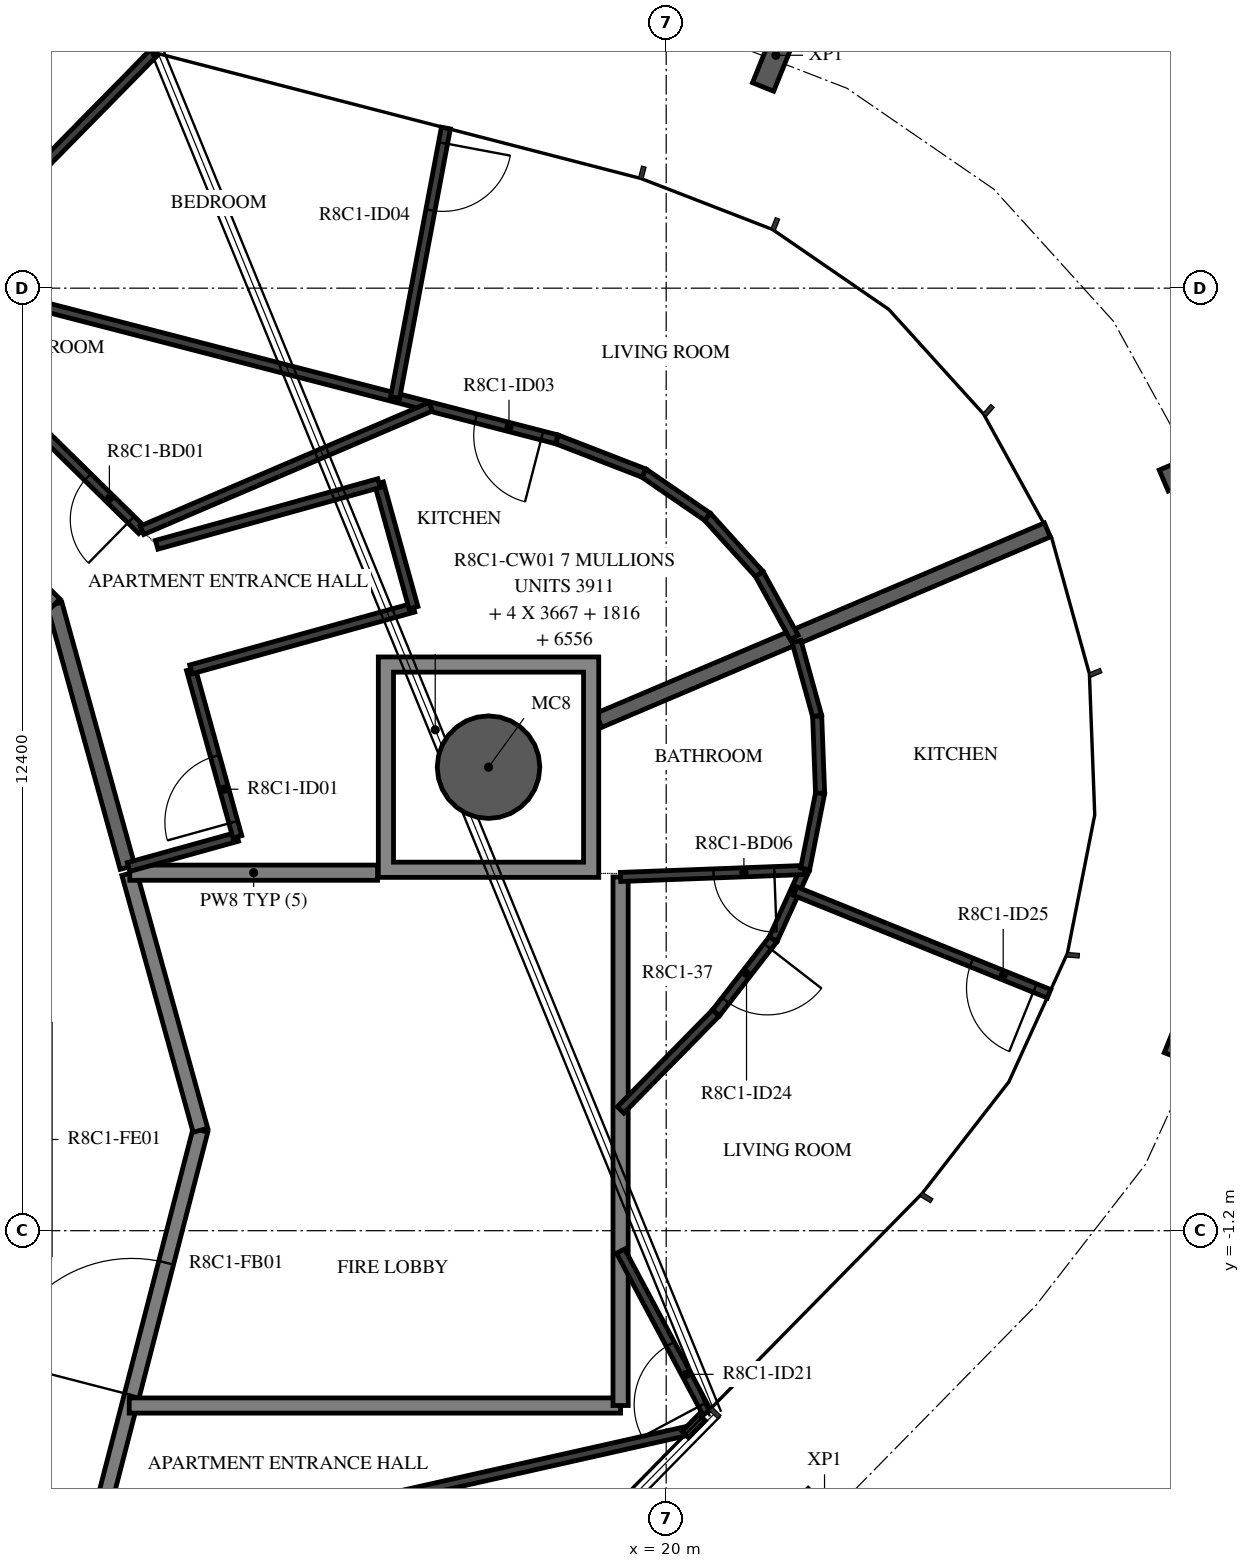
"""IFC4 building model, lengths in metres.
Left out: names, types, materials, properties, quantities, classifications, styles, units other than length and angle.
Written with IfcOpenShell. Run it as: python <this file> out.ifc"""

import sys

from ifc_helpers import new_model, si_unit, direction, frame, frame_2d, origin, origin_2d, place, context, subcontext, project, spatial, polyline, rectangle, hollow_circle, i_section, outline, extrude, element, fill, save


model = new_model("IFC4")
c1 = context("Model", 3, precision=1e-05, world=origin(), true_north=direction((0.0, 1.0)))
c2 = subcontext(c1, "Body", "Model", "MODEL_VIEW")
j1 = project(units=[si_unit("LENGTHUNIT", "METRE"), si_unit("PLANEANGLEUNIT", "RADIAN")], contexts=[c1])
p1 = place(None, origin())
s1 = spatial("IfcSite", under=j1, at=p1, CompositionType="ELEMENT")
p2 = place(p1, origin())
s2 = spatial("IfcBuilding", under=s1, at=p2, CompositionType="ELEMENT")
p3 = place(p2, frame((0.0, 0.0, 322.7)))
s3 = spatial("IfcBuildingStorey", under=s2, at=p3, CompositionType="ELEMENT", Elevation=322.7)
p4 = place(p3, frame((17.663, 4.898, -0.38), z_axis=(0.0, 0.0, 1.0), x_axis=(1.0, 0.0, 0.0)))
e1 = element("IfcColumn", 1, at=p4, inside=s3, PredefinedType="COLUMN", context=c2, shape_type="SweptSolid", body=[
    extrude(hollow_circle(Radius=0.675, WallThickness=0.03, at=origin_2d()), origin(), (0.0, 0.0, 1.0), 2.616),
])
for number, where, z_axis, x_axis in (
    (2, (22.083, -5.013, -0.38), (0.0, 0.0, 1.0), (-0.701, -0.713, 0.0)),
    (3, (27.026, 1.113, -0.38), (0.0, 0.0, 1.0), (-0.375, -0.927, 0.0)),
    (4, (26.96, 8.845, -0.38), (0.0, 0.0, 1.0), (0.391, -0.92, 0.0)),
    (5, (21.443, 14.264, -0.38), (0.0, 0.0, 1.0), (0.927, -0.374, 0.0)),
):
    element("IfcColumn", number, at=place(p3, frame(where, z_axis=z_axis, x_axis=x_axis)), inside=s3, PredefinedType="COLUMN", context=c2, shape_type="SweptSolid", body=[
        extrude(i_section(OverallWidth=0.3, OverallDepth=0.9, WebThickness=0.019, FlangeThickness=0.035, FilletRadius=0.03, at=origin_2d()), origin(), (0.0, 0.0, 1.0), 2.616),
    ])
p5 = place(p3, frame((12.074, -6.831, 0.0), z_axis=(0.0, 0.0, 1.0), x_axis=(0.250391063186, 0.968144780225, 0.0)))
e6 = element("IfcWall", 6, at=p5, inside=s3, PredefinedType="STANDARD", context=c2, shape_type="SweptSolid", body=[
    extrude(rectangle(XDim=7.181, YDim=0.2, at=frame_2d((3.591, 0.0))), origin(), (0.0, 0.0, 1.0), 3.05),
])
p6 = place(p5, frame((3.581, 0.0, 0.0)))
e7 = element("IfcOpeningElement", 7, at=p6, cuts=e6, PredefinedType="OPENING", context=c2, shape_type="SweptSolid", body=[
    extrude(rectangle(XDim=1.8, YDim=2.1, at=frame_2d((0.9, 1.05))), frame((0.0, 0.11, 0.0), z_axis=(0.0, -1.0, 0.0), x_axis=(1.0, 0.0, 0.0)), (0.0, 0.0, 1.0), 0.22),
])
p7 = place(p3, frame((13.872, 0.121, 0.0), z_axis=(0.0, 0.0, 1.0), x_axis=(-0.267291928416, 0.963615600228, 0.0)))
e8 = element("IfcWall", 8, at=p7, inside=s3, PredefinedType="STANDARD", context=c2, shape_type="SweptSolid", body=[
    extrude(rectangle(XDim=3.507, YDim=0.2, at=frame_2d((1.753, 0.0))), origin(), (0.0, 0.0, 1.0), 3.05),
])
p8 = place(p3, frame((12.913, 3.581, 0.0), z_axis=(0.0, 0.0, 1.0), x_axis=(-0.267223005422, 0.963634715737, 0.0)))
e9 = element("IfcWall", 9, at=p8, inside=s3, PredefinedType="STANDARD", context=c2, shape_type="SweptSolid", body=[
    extrude(rectangle(XDim=3.591, YDim=0.2, at=frame_2d((1.795, 0.0))), origin(), (0.0, 0.0, 1.0), 3.05),
])
p9 = place(p3, frame((11.953, 7.041, 0.0), z_axis=(0.0, 0.0, 1.0), x_axis=(-0.713250549143, 0.70090916255, 0.0)))
e10 = element("IfcWall", 10, at=p9, inside=s3, PredefinedType="STANDARD", context=c2, shape_type="SweptSolid", body=[
    extrude(rectangle(XDim=7.181, YDim=0.2, at=frame_2d((3.59, 0.0))), origin(), (0.0, 0.0, 1.0), 3.05),
])
p10 = place(p9, frame((2.6, 0.0, 0.0)))
e11 = element("IfcOpeningElement", 11, at=p10, cuts=e10, PredefinedType="OPENING", context=c2, shape_type="SweptSolid", body=[
    extrude(rectangle(XDim=1.0, YDim=2.1, at=frame_2d((0.5, 1.05))), frame((0.0, 0.11, 0.0), z_axis=(0.0, -1.0, 0.0), x_axis=(1.0, 0.0, 0.0)), (0.0, 0.0, 1.0), 0.22),
])
p11 = place(p3, frame((16.203, 3.51, 0.0), z_axis=(0.0, 0.0, 1.0), x_axis=(-1.0, 0.0, 0.0)))
e12 = element("IfcWall", 12, at=p11, inside=s3, PredefinedType="STANDARD", context=c2, shape_type="SweptSolid", body=[
    extrude(rectangle(XDim=3.26, YDim=0.2, at=frame_2d((1.63, 0.0))), origin(), (0.0, 0.0, 1.0), 3.05),
])
p12 = place(p3, frame((12.936, -3.5, 0.0), z_axis=(0.0, 0.0, 1.0), x_axis=(1.0, 0.0, 0.0)))
e13 = element("IfcWall", 13, at=p12, inside=s3, PredefinedType="STANDARD", context=c2, shape_type="SweptSolid", body=[
    extrude(rectangle(XDim=6.464, YDim=0.2, at=frame_2d((3.232, 0.0))), origin(), (0.0, 0.0, 1.0), 3.05),
])
p13 = place(p3, frame((19.4, -3.5, 0.0), z_axis=(0.0, 0.0, 1.0), x_axis=(0.0, 1.0, 0.0)))
e14 = element("IfcWall", 14, at=p13, inside=s3, PredefinedType="STANDARD", context=c2, shape_type="SweptSolid", body=[
    extrude(rectangle(XDim=6.954, YDim=0.2, at=frame_2d((3.477, 0.0))), origin(), (0.0, 0.0, 1.0), 3.05),
])
p14 = place(p3, frame((19.113, 5.514, 0.0), z_axis=(0.0, 0.0, 1.0), x_axis=(0.920500452946, 0.390741495269, 0.0)))
e15 = element("IfcWall", 15, at=p14, inside=s3, PredefinedType="STANDARD", context=c2, shape_type="SweptSolid", body=[
    extrude(rectangle(XDim=6.412, YDim=0.2, at=frame_2d((3.206, 0.0))), origin(), (0.0, 0.0, 1.0), 3.05),
])
p15 = place(p3, frame((12.927, 3.585, 0.0), z_axis=(0.0, 0.0, 1.0), x_axis=(0.963616756608, 0.26728775951, 0.0)))
e16 = element("IfcWall", 16, at=p15, inside=s3, PredefinedType="PARTITIONING", context=c2, shape_type="SweptSolid", body=[
    extrude(rectangle(XDim=1.485, YDim=0.12, at=frame_2d((0.743, 0.0))), origin(), (0.0, 0.0, 1.0), 3.05),
])
p16 = place(p3, frame((14.358, 3.982, 0.0), z_axis=(0.0, 0.0, 1.0), x_axis=(-0.267263698345, 0.963623430364, 0.0)))
e17 = element("IfcWall", 17, at=p16, inside=s3, PredefinedType="PARTITIONING", context=c2, shape_type="SweptSolid", body=[
    extrude(rectangle(XDim=2.286, YDim=0.12, at=frame_2d((1.143, 0.0))), origin(), (0.0, 0.0, 1.0), 3.05),
])
p17 = place(p16, frame((0.2, 0.0, 0.0)))
e18 = element("IfcOpeningElement", 18, at=p17, cuts=e17, PredefinedType="OPENING", context=c2, shape_type="SweptSolid", body=[
    extrude(rectangle(XDim=0.9, YDim=2.1, at=frame_2d((0.45, 1.05))), frame((0.0, 0.07, 0.0), z_axis=(0.0, -1.0, 0.0), x_axis=(1.0, 0.0, 0.0)), (0.0, 0.0, 1.0), 0.14),
])
p18 = place(p3, frame((13.747, 6.184, 0.0), z_axis=(0.0, 0.0, 1.0), x_axis=(0.963620272151, 0.267275085073, 0.0)))
e19 = element("IfcWall", 19, at=p18, inside=s3, PredefinedType="PARTITIONING", context=c2, shape_type="SweptSolid", body=[
    extrude(rectangle(XDim=3.039, YDim=0.12, at=frame_2d((1.52, 0.0))), origin(), (0.0, 0.0, 1.0), 3.05),
])
p19 = place(p3, frame((16.676, 6.997, 0.0), z_axis=(0.0, 0.0, 1.0), x_axis=(-0.267258687102, 0.963624820233, 0.0)))
e20 = element("IfcWall", 20, at=p19, inside=s3, PredefinedType="PARTITIONING", context=c2, shape_type="SweptSolid", body=[
    extrude(rectangle(XDim=1.7, YDim=0.12, at=frame_2d((0.85, 0.0))), origin(), (0.0, 0.0, 1.0), 3.05),
])
p20 = place(p3, frame((16.221, 8.635, 0.0), z_axis=(0.0, 0.0, 1.0), x_axis=(-0.963616947452, -0.267287071484, 0.0)))
e21 = element("IfcWall", 21, at=p20, inside=s3, PredefinedType="PARTITIONING", context=c2, shape_type="SweptSolid", body=[
    extrude(rectangle(XDim=3.035, YDim=0.12, at=frame_2d((1.518, 0.0))), origin(), (0.0, 0.0, 1.0), 3.05),
])
p21 = place(p3, frame((13.103, 8.014, 0.0), z_axis=(0.0, 0.0, 1.0), x_axis=(-0.713261822754, 0.700897690253, 0.0)))
e22 = element("IfcWall", 22, at=p21, inside=s3, PredefinedType="PARTITIONING", context=c2, shape_type="SweptSolid", body=[
    extrude(rectangle(XDim=7.721, YDim=0.12, at=frame_2d((3.86, 0.0))), origin(), (0.0, 0.0, 1.0), 3.05),
])
p22 = place(p21, frame((0.2, 0.0, 0.0)))
e23 = element("IfcOpeningElement", 23, at=p22, cuts=e22, PredefinedType="OPENING", context=c2, shape_type="SweptSolid", body=[
    extrude(rectangle(XDim=0.8, YDim=2.1, at=frame_2d((0.4, 1.05))), frame((0.0, 0.07, 0.0), z_axis=(0.0, -1.0, 0.0), x_axis=(1.0, 0.0, 0.0)), (0.0, 0.0, 1.0), 0.14),
])
p23 = place(p21, frame((5.25, 0.0, 0.0)))
e24 = element("IfcOpeningElement", 24, at=p23, cuts=e22, PredefinedType="OPENING", context=c2, shape_type="SweptSolid", body=[
    extrude(rectangle(XDim=0.9, YDim=2.1, at=frame_2d((0.45, 1.05))), frame((0.0, 0.07, 0.0), z_axis=(0.0, -1.0, 0.0), x_axis=(1.0, 0.0, 0.0)), (0.0, 0.0, 1.0), 0.14),
])
p24 = place(p3, frame((21.684, 6.605, 0.0), z_axis=(0.0, 0.0, 1.0), x_axis=(-0.482263369205, 0.876026279699, 0.0)))
e25 = element("IfcWall", 25, at=p24, inside=s3, PredefinedType="PARTITIONING", context=c2, shape_type="SweptSolid", body=[
    extrude(rectangle(XDim=0.952, YDim=0.12, at=frame_2d((0.476, 0.0))), origin(), (0.0, 0.0, 1.0), 3.05),
])
for number, where, z_axis, x_axis in (
    (26, (21.225, 7.439, 0.0), (0.0, 0.0, 1.0), (-0.671, 0.741, 0.0)),
    (27, (20.543, 8.192, 0.0), (0.0, 0.0, 1.0), (-0.824, 0.566, 0.0)),
):
    element("IfcWall", number, at=place(p3, frame(where, z_axis=z_axis, x_axis=x_axis)), inside=s3, PredefinedType="PARTITIONING", context=c2, shape_type="SweptSolid", body=[
        extrude(rectangle(XDim=1.016, YDim=0.12, at=frame_2d((0.508, 0.0))), origin(), (0.0, 0.0, 1.0), 3.05),
    ])
p25 = place(p3, frame((19.706, 8.768, 0.0), z_axis=(0.0, 0.0, 1.0), x_axis=(-0.932522717361, 0.361111314702, 0.0)))
e28 = element("IfcWall", 28, at=p25, inside=s3, PredefinedType="PARTITIONING", context=c2, shape_type="SweptSolid", body=[
    extrude(rectangle(XDim=1.227, YDim=0.12, at=frame_2d((0.614, 0.0))), origin(), (0.0, 0.0, 1.0), 3.05),
])
p26 = place(p3, frame((18.561, 9.211, 0.0), z_axis=(0.0, 0.0, 1.0), x_axis=(-0.968146475492, 0.250384508293, 0.0)))
e29 = element("IfcWall", 29, at=p26, inside=s3, PredefinedType="PARTITIONING", context=c2, shape_type="SweptSolid", body=[
    extrude(rectangle(XDim=9.359, YDim=0.12, at=frame_2d((4.679, 0.0))), origin(), (0.0, 0.0, 1.0), 3.05),
])
p27 = place(p26, frame((0.2, 0.0, 0.0)))
e30 = element("IfcOpeningElement", 30, at=p27, cuts=e29, PredefinedType="OPENING", context=c2, shape_type="SweptSolid", body=[
    extrude(rectangle(XDim=0.9, YDim=2.1, at=frame_2d((0.45, 1.05))), frame((0.0, 0.07, 0.0), z_axis=(0.0, -1.0, 0.0), x_axis=(1.0, 0.0, 0.0)), (0.0, 0.0, 1.0), 0.14),
])
p28 = place(p3, frame((16.902, 9.64, 0.0), z_axis=(0.0, 0.0, 1.0), x_axis=(-0.919371033545, -0.393391538647, 0.0)))
e31 = element("IfcWall", 31, at=p28, inside=s3, PredefinedType="PARTITIONING", context=c2, shape_type="SweptSolid", body=[
    extrude(rectangle(XDim=4.132, YDim=0.12, at=frame_2d((2.066, 0.0))), origin(), (0.0, 0.0, 1.0), 3.05),
])
p29 = place(p3, frame((17.102, 13.307, 0.0), z_axis=(0.0, 0.0, 1.0), x_axis=(-0.185134164105, -0.982713254862, 0.0)))
e32 = element("IfcWall", 32, at=p29, inside=s3, PredefinedType="PARTITIONING", context=c2, shape_type="SweptSolid", body=[
    extrude(rectangle(XDim=3.608, YDim=0.12, at=frame_2d((1.804, 0.0))), origin(), (0.0, 0.0, 1.0), 3.05),
])
p30 = place(p29, frame((0.2, 0.0, 0.0)))
e33 = element("IfcOpeningElement", 33, at=p30, cuts=e32, PredefinedType="OPENING", context=c2, shape_type="SweptSolid", body=[
    extrude(rectangle(XDim=0.9, YDim=2.1, at=frame_2d((0.45, 1.05))), frame((0.0, 0.07, 0.0), z_axis=(0.0, -1.0, 0.0), x_axis=(1.0, 0.0, 0.0)), (0.0, 0.0, 1.0), 0.14),
])
p31 = place(p3, frame((13.26, 14.3, 0.0), z_axis=(0.0, 0.0, 1.0), x_axis=(-0.700942858884, -0.713217434293, 0.0)))
e34 = element("IfcWall", 34, at=p31, inside=s3, PredefinedType="PARTITIONING", context=c2, shape_type="SweptSolid", body=[
    extrude(rectangle(XDim=4.157, YDim=0.12, at=frame_2d((2.079, 0.0))), origin(), (0.0, 0.0, 1.0), 3.05),
])
p32 = place(p3, frame((20.535, -3.593, 0.0), z_axis=(0.0, 0.0, 1.0), x_axis=(-0.471340561072, 0.881951288614, 0.0)))
e35 = element("IfcWall", 35, at=p32, inside=s3, PredefinedType="PARTITIONING", context=c2, shape_type="SweptSolid", body=[
    extrude(rectangle(XDim=2.408, YDim=0.12, at=frame_2d((1.204, 0.0))), origin(), (0.0, 0.0, 1.0), 3.05),
])
p33 = place(p32, frame((0.12, 0.0, 0.0)))
e36 = element("IfcOpeningElement", 36, at=p33, cuts=e35, PredefinedType="OPENING", context=c2, shape_type="SweptSolid", body=[
    extrude(rectangle(XDim=0.9, YDim=2.1, at=frame_2d((0.45, 1.05))), frame((0.0, 0.07, 0.0), z_axis=(0.0, -1.0, 0.0), x_axis=(1.0, 0.0, 0.0)), (0.0, 0.0, 1.0), 0.14),
])
p34 = place(p3, frame((14.036, -5.237, 0.0), z_axis=(0.0, 0.0, 1.0), x_axis=(0.975645756324, 0.219352132805, 0.0)))
e37 = element("IfcWall", 37, at=p34, inside=s3, PredefinedType="PARTITIONING", context=c2, shape_type="SweptSolid", body=[
    extrude(rectangle(XDim=6.424, YDim=0.12, at=frame_2d((3.212, 0.0))), origin(), (0.0, 0.0, 1.0), 3.05),
])
p35 = place(p3, frame((20.471, -3.657, 0.0), z_axis=(0.0, 0.0, 1.0), x_axis=(-0.700842635321, -0.713315919153, 0.0)))
e38 = element("IfcWall", 38, at=p35, inside=s3, PredefinedType="PARTITIONING", context=c2, shape_type="SweptSolid", body=[
    extrude(rectangle(XDim=0.313, YDim=0.12, at=frame_2d((0.157, 0.0))), origin(), (0.0, 0.0, 1.0), 3.05),
])
p36 = place(p3, frame((21.828, 3.558, 0.0), z_axis=(0.0, 0.0, 1.0), x_axis=(-0.414726005229, -0.909946339399, 0.0)))
e39 = element("IfcWall", 39, at=p36, inside=s3, PredefinedType="PARTITIONING", context=c2, shape_type="SweptSolid", body=[
    extrude(rectangle(XDim=1.016, YDim=0.12, at=frame_2d((0.508, 0.0))), origin(), (0.0, 0.0, 1.0), 3.05),
])
p37 = place(p3, frame((21.406, 2.634, 0.0), z_axis=(0.0, 0.0, 1.0), x_axis=(-0.613444581667, -0.789737769911, 0.0)))
e40 = element("IfcWall", 40, at=p37, inside=s3, PredefinedType="PARTITIONING", context=c2, shape_type="SweptSolid", body=[
    extrude(rectangle(XDim=1.227, YDim=0.12, at=frame_2d((0.614, 0.0))), origin(), (0.0, 0.0, 1.0), 3.05),
])
p38 = place(p37, frame((0.12, 0.0, 0.0)))
e41 = element("IfcOpeningElement", 41, at=p38, cuts=e40, PredefinedType="OPENING", context=c2, shape_type="SweptSolid", body=[
    extrude(rectangle(XDim=0.9, YDim=2.1, at=frame_2d((0.45, 1.05))), frame((0.0, 0.07, 0.0), z_axis=(0.0, -1.0, 0.0), x_axis=(1.0, 0.0, 0.0)), (0.0, 0.0, 1.0), 0.14),
])
p39 = place(p3, frame((20.654, 1.665, 0.0), z_axis=(0.0, 0.0, 1.0), x_axis=(-0.700870484553, -0.713288555833, 0.0)))
e42 = element("IfcWall", 42, at=p39, inside=s3, PredefinedType="PARTITIONING", context=c2, shape_type="SweptSolid", body=[
    extrude(rectangle(XDim=1.789, YDim=0.12, at=frame_2d((0.895, 0.0))), origin(), (0.0, 0.0, 1.0), 3.05),
])
p40 = place(p3, frame((25.036, 1.917, 0.0), z_axis=(0.0, 0.0, 1.0), x_axis=(-0.927096540393, 0.374822631108, 0.0)))
e43 = element("IfcWall", 43, at=p40, inside=s3, PredefinedType="PARTITIONING", context=c2, shape_type="SweptSolid", body=[
    extrude(rectangle(XDim=3.603, YDim=0.12, at=frame_2d((1.802, 0.0))), origin(), (0.0, 0.0, 1.0), 3.05),
])
p41 = place(p40, frame((0.2, 0.0, 0.0)))
e44 = element("IfcOpeningElement", 44, at=p41, cuts=e43, PredefinedType="OPENING", context=c2, shape_type="SweptSolid", body=[
    extrude(rectangle(XDim=0.9, YDim=2.1, at=frame_2d((0.45, 1.05))), frame((0.0, 0.07, 0.0), z_axis=(0.0, -1.0, 0.0), x_axis=(1.0, 0.0, 0.0)), (0.0, 0.0, 1.0), 0.14),
])
p42 = place(p3, frame((21.822, 3.545, 0.0), z_axis=(0.0, 0.0, 1.0), x_axis=(-0.999286397149, -0.037771635816, 0.0)))
e45 = element("IfcWall", 45, at=p42, inside=s3, PredefinedType="PARTITIONING", context=c2, shape_type="SweptSolid", body=[
    extrude(rectangle(XDim=2.424, YDim=0.12, at=frame_2d((1.212, 0.0))), origin(), (0.0, 0.0, 1.0), 3.05),
])
p43 = place(p42, frame((0.4, 0.0, 0.0)))
e46 = element("IfcOpeningElement", 46, at=p43, cuts=e45, PredefinedType="OPENING", context=c2, shape_type="SweptSolid", body=[
    extrude(rectangle(XDim=0.8, YDim=2.1, at=frame_2d((0.4, 1.05))), frame((0.0, 0.07, 0.0), z_axis=(0.0, -1.0, 0.0), x_axis=(1.0, 0.0, 0.0)), (0.0, 0.0, 1.0), 0.14),
])
for number, where, z_axis, x_axis in (
    (47, (21.715, 6.549, 0.0), (0.0, 0.0, 1.0), (0.267, -0.964, 0.0)),
    (48, (21.986, 5.57, 0.0), (0.0, 0.0, 1.0), (0.038, -0.999, 0.0)),
    (49, (22.025, 4.555, 0.0), (0.0, 0.0, 1.0), (-0.194, -0.981, 0.0)),
):
    element("IfcWall", number, at=place(p3, frame(where, z_axis=z_axis, x_axis=x_axis)), inside=s3, PredefinedType="PARTITIONING", context=c2, shape_type="SweptSolid", body=[
        extrude(rectangle(XDim=1.016, YDim=0.12, at=frame_2d((0.508, 0.0))), origin(), (0.0, 0.0, 1.0), 3.05),
    ])
p44 = place(p3, origin())
e50 = element("IfcWall", 50, at=p44, inside=s3, PredefinedType="STANDARD", context=c2, shape_type="SweptSolid", body=[
    extrude(outline(polyline([(19.113, 6.348), (19.113, 3.448), (16.213, 3.448), (16.213, 6.348), (19.113, 6.348)]), holes=[polyline([(16.413, 3.648), (18.913, 3.648), (18.913, 6.148), (16.413, 6.148), (16.413, 3.648)])]), origin(), (0.0, 0.0, 1.0), 3.05),
])
p45 = place(p17, origin())
e51 = element("IfcDoor", 51, at=p45, inside=s3, OperationType="SINGLE_SWING_LEFT", PredefinedType="DOOR", context=c2, shape_type="SweptSolid", body=[
    extrude(rectangle(XDim=0.9, YDim=2.1, at=frame_2d((0.45, 1.05))), frame((0.0, 0.025, 0.0), z_axis=(0.0, -1.0, 0.0), x_axis=(1.0, 0.0, 0.0)), (0.0, 0.0, 1.0), 0.05),
])
fill(e18, e51)
p46 = place(p22, origin())
e52 = element("IfcDoor", 52, at=p46, inside=s3, OperationType="SINGLE_SWING_LEFT", PredefinedType="DOOR", context=c2, shape_type="SweptSolid", body=[
    extrude(rectangle(XDim=0.8, YDim=2.1, at=frame_2d((0.4, 1.05))), frame((0.0, 0.025, 0.0), z_axis=(0.0, -1.0, 0.0), x_axis=(1.0, 0.0, 0.0)), (0.0, 0.0, 1.0), 0.05),
])
fill(e23, e52)
p47 = place(p27, origin())
e53 = element("IfcDoor", 53, at=p47, inside=s3, OperationType="SINGLE_SWING_LEFT", PredefinedType="DOOR", context=c2, shape_type="SweptSolid", body=[
    extrude(rectangle(XDim=0.9, YDim=2.1, at=frame_2d((0.45, 1.05))), frame((0.0, 0.025, 0.0), z_axis=(0.0, -1.0, 0.0), x_axis=(1.0, 0.0, 0.0)), (0.0, 0.0, 1.0), 0.05),
])
fill(e30, e53)
p48 = place(p30, origin())
e54 = element("IfcDoor", 54, at=p48, inside=s3, OperationType="SINGLE_SWING_RIGHT", PredefinedType="DOOR", context=c2, shape_type="SweptSolid", body=[
    extrude(rectangle(XDim=0.9, YDim=2.1, at=frame_2d((0.45, 1.05))), frame((0.0, 0.025, 0.0), z_axis=(0.0, -1.0, 0.0), x_axis=(1.0, 0.0, 0.0)), (0.0, 0.0, 1.0), 0.05),
])
fill(e33, e54)
p49 = place(p33, origin())
e55 = element("IfcDoor", 55, at=p49, inside=s3, OperationType="SINGLE_SWING_RIGHT", PredefinedType="DOOR", context=c2, shape_type="SweptSolid", body=[
    extrude(rectangle(XDim=0.9, YDim=2.1, at=frame_2d((0.45, 1.05))), frame((0.0, 0.025, 0.0), z_axis=(0.0, -1.0, 0.0), x_axis=(1.0, 0.0, 0.0)), (0.0, 0.0, 1.0), 0.05),
])
fill(e36, e55)
p50 = place(p38, origin())
e56 = element("IfcDoor", 56, at=p50, inside=s3, OperationType="SINGLE_SWING_RIGHT", PredefinedType="DOOR", context=c2, shape_type="SweptSolid", body=[
    extrude(rectangle(XDim=0.9, YDim=2.1, at=frame_2d((0.45, 1.05))), frame((0.0, 0.025, 0.0), z_axis=(0.0, -1.0, 0.0), x_axis=(1.0, 0.0, 0.0)), (0.0, 0.0, 1.0), 0.05),
])
fill(e41, e56)
p51 = place(p43, origin())
e57 = element("IfcDoor", 57, at=p51, inside=s3, OperationType="SINGLE_SWING_RIGHT", PredefinedType="DOOR", context=c2, shape_type="SweptSolid", body=[
    extrude(rectangle(XDim=0.8, YDim=2.1, at=frame_2d((0.4, 1.05))), frame((0.0, 0.025, 0.0), z_axis=(0.0, -1.0, 0.0), x_axis=(1.0, 0.0, 0.0)), (0.0, 0.0, 1.0), 0.05),
])
fill(e46, e57)
p52 = place(p41, origin())
e58 = element("IfcDoor", 58, at=p52, inside=s3, OperationType="SINGLE_SWING_RIGHT", PredefinedType="DOOR", context=c2, shape_type="SweptSolid", body=[
    extrude(rectangle(XDim=0.9, YDim=2.1, at=frame_2d((0.45, 1.05))), frame((0.0, 0.025, 0.0), z_axis=(0.0, -1.0, 0.0), x_axis=(1.0, 0.0, 0.0)), (0.0, 0.0, 1.0), 0.05),
])
fill(e44, e58)
p53 = place(p6, origin())
e59 = element("IfcDoor", 59, at=p53, inside=s3, OperationType="DOUBLE_DOOR_SINGLE_SWING", PredefinedType="DOOR", context=c2, shape_type="SweptSolid", body=[
    extrude(rectangle(XDim=1.8, YDim=2.1, at=frame_2d((0.9, 1.05))), frame((0.0, 0.025, 0.0), z_axis=(0.0, -1.0, 0.0), x_axis=(1.0, 0.0, 0.0)), (0.0, 0.0, 1.0), 0.05),
])
fill(e7, e59)
save(model, sys.argv[1])
